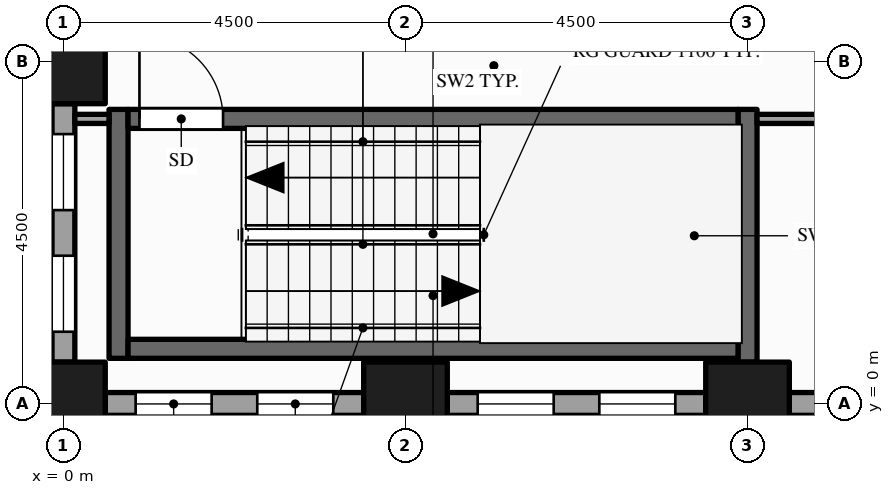
"""IFC4 building model, lengths in metres.
Left out: names, types, materials, properties, quantities, classifications, styles, units other than length and angle.
Written with IfcOpenShell. Run it as: python <this file> out.ifc"""

import sys

from ifc_helpers import new_model, si_unit, direction, frame, frame_2d, origin, origin_2d, place, context, subcontext, project, spatial, rectangle, hollow_rectangle, extrude, element, fill, save


model = new_model("IFC4")
c1 = context("Model", 3, precision=1e-05, world=origin(), true_north=direction((0.0, 1.0)))
c2 = subcontext(c1, "Body", "Model", "MODEL_VIEW")
j1 = project(units=[si_unit("LENGTHUNIT", "METRE"), si_unit("PLANEANGLEUNIT", "RADIAN")], contexts=[c1])
p1 = place(None, origin())
s1 = spatial("IfcSite", under=j1, at=p1, CompositionType="ELEMENT")
p2 = place(p1, origin())
s2 = spatial("IfcBuilding", under=s1, at=p2, CompositionType="ELEMENT")
p3 = place(p2, frame((0.0, 0.0, 69.0)))
s3 = spatial("IfcBuildingStorey", under=s2, at=p3, CompositionType="ELEMENT", Elevation=69.0)
for number, where, z_axis, x_axis in (
    (1, (0.0, 0.0, -0.15), (0.0, 0.0, 1.0), (1.0, 0.0, 0.0)),
    (2, (0.0, 4.5, -0.15), (0.0, 0.0, 1.0), (1.0, 0.0, 0.0)),
    (3, (4.5, 0.0, -0.15), (0.0, 0.0, 1.0), (1.0, 0.0, 0.0)),
    (4, (9.0, 0.0, -0.15), (0.0, 0.0, 1.0), (1.0, 0.0, 0.0)),
):
    element("IfcColumn", number, at=place(p3, frame(where, z_axis=z_axis, x_axis=x_axis)), inside=s3, PredefinedType="COLUMN", context=c2, shape_type="SweptSolid", body=[
        extrude(hollow_rectangle(XDim=1.1, YDim=1.1, WallThickness=0.06, at=origin_2d()), origin(), (0.0, 0.0, 1.0), 4.0),
    ])
p4 = place(p3, frame((0.55, 0.0, 0.0), z_axis=(0.0, 0.0, 1.0), x_axis=(1.0, 0.0, 0.0)))
e5 = element("IfcWall", 5, at=p4, inside=s3, PredefinedType="STANDARD", context=c2, shape_type="SweptSolid", body=[
    extrude(rectangle(XDim=3.4, YDim=0.3, at=frame_2d((1.7, 0.0))), origin(), (0.0, 0.0, 1.0), 3.144),
])
p5 = place(p4, frame((0.4, 0.0, 0.9)))
e6 = element("IfcOpeningElement", 6, at=p5, cuts=e5, PredefinedType="OPENING", context=c2, shape_type="SweptSolid", body=[
    extrude(rectangle(XDim=1.0, YDim=2.0, at=frame_2d((0.5, 1.0))), frame((0.0, 0.16, 0.0), z_axis=(0.0, -1.0, 0.0), x_axis=(1.0, 0.0, 0.0)), (0.0, 0.0, 1.0), 0.32),
])
p6 = place(p4, frame((2.0, 0.0, 0.9)))
e7 = element("IfcOpeningElement", 7, at=p6, cuts=e5, PredefinedType="OPENING", context=c2, shape_type="SweptSolid", body=[
    extrude(rectangle(XDim=1.0, YDim=2.0, at=frame_2d((0.5, 1.0))), frame((0.0, 0.16, 0.0), z_axis=(0.0, -1.0, 0.0), x_axis=(1.0, 0.0, 0.0)), (0.0, 0.0, 1.0), 0.32),
])
p7 = place(p3, frame((5.05, 0.0, 0.0), z_axis=(0.0, 0.0, 1.0), x_axis=(1.0, 0.0, 0.0)))
e8 = element("IfcWall", 8, at=p7, inside=s3, PredefinedType="STANDARD", context=c2, shape_type="SweptSolid", body=[
    extrude(rectangle(XDim=3.4, YDim=0.3, at=frame_2d((1.7, 0.0))), origin(), (0.0, 0.0, 1.0), 3.144),
])
p8 = place(p7, frame((0.4, 0.0, 0.9)))
e9 = element("IfcOpeningElement", 9, at=p8, cuts=e8, PredefinedType="OPENING", context=c2, shape_type="SweptSolid", body=[
    extrude(rectangle(XDim=1.0, YDim=2.0, at=frame_2d((0.5, 1.0))), frame((0.0, 0.16, 0.0), z_axis=(0.0, -1.0, 0.0), x_axis=(1.0, 0.0, 0.0)), (0.0, 0.0, 1.0), 0.32),
])
p9 = place(p7, frame((2.0, 0.0, 0.9)))
e10 = element("IfcOpeningElement", 10, at=p9, cuts=e8, PredefinedType="OPENING", context=c2, shape_type="SweptSolid", body=[
    extrude(rectangle(XDim=1.0, YDim=2.0, at=frame_2d((0.5, 1.0))), frame((0.0, 0.16, 0.0), z_axis=(0.0, -1.0, 0.0), x_axis=(1.0, 0.0, 0.0)), (0.0, 0.0, 1.0), 0.32),
])
p10 = place(p3, frame((9.55, 0.0, 0.0), z_axis=(0.0, 0.0, 1.0), x_axis=(1.0, 0.0, 0.0)))
e11 = element("IfcWall", 11, at=p10, inside=s3, PredefinedType="STANDARD", context=c2, shape_type="SweptSolid", body=[
    extrude(rectangle(XDim=3.4, YDim=0.3, at=frame_2d((1.7, 0.0))), origin(), (0.0, 0.0, 1.0), 3.144),
])
p11 = place(p10, frame((0.4, 0.0, 0.9)))
e12 = element("IfcOpeningElement", 12, at=p11, cuts=e11, PredefinedType="OPENING", context=c2, shape_type="SweptSolid", body=[
    extrude(rectangle(XDim=1.0, YDim=2.0, at=frame_2d((0.5, 1.0))), frame((0.0, 0.16, 0.0), z_axis=(0.0, -1.0, 0.0), x_axis=(1.0, 0.0, 0.0)), (0.0, 0.0, 1.0), 0.32),
])
p12 = place(p10, frame((2.0, 0.0, 0.9)))
e13 = element("IfcOpeningElement", 13, at=p12, cuts=e11, PredefinedType="OPENING", context=c2, shape_type="SweptSolid", body=[
    extrude(rectangle(XDim=1.0, YDim=2.0, at=frame_2d((0.5, 1.0))), frame((0.0, 0.16, 0.0), z_axis=(0.0, -1.0, 0.0), x_axis=(1.0, 0.0, 0.0)), (0.0, 0.0, 1.0), 0.32),
])
p13 = place(p3, frame((0.0, 3.95, 0.0), z_axis=(0.0, 0.0, 1.0), x_axis=(0.0, -1.0, 0.0)))
e14 = element("IfcWall", 14, at=p13, inside=s3, PredefinedType="STANDARD", context=c2, shape_type="SweptSolid", body=[
    extrude(rectangle(XDim=3.4, YDim=0.3, at=frame_2d((1.7, 0.0))), origin(), (0.0, 0.0, 1.0), 3.144),
])
p14 = place(p13, frame((0.4, 0.0, 0.9)))
e15 = element("IfcOpeningElement", 15, at=p14, cuts=e14, PredefinedType="OPENING", context=c2, shape_type="SweptSolid", body=[
    extrude(rectangle(XDim=1.0, YDim=2.0, at=frame_2d((0.5, 1.0))), frame((0.0, 0.16, 0.0), z_axis=(0.0, -1.0, 0.0), x_axis=(1.0, 0.0, 0.0)), (0.0, 0.0, 1.0), 0.32),
])
p15 = place(p13, frame((2.0, 0.0, 0.9)))
e16 = element("IfcOpeningElement", 16, at=p15, cuts=e14, PredefinedType="OPENING", context=c2, shape_type="SweptSolid", body=[
    extrude(rectangle(XDim=1.0, YDim=2.0, at=frame_2d((0.5, 1.0))), frame((0.0, 0.16, 0.0), z_axis=(0.0, -1.0, 0.0), x_axis=(1.0, 0.0, 0.0)), (0.0, 0.0, 1.0), 0.32),
])
p16 = place(p3, frame((0.725, 0.6, 0.0), z_axis=(0.0, 0.0, 1.0), x_axis=(0.0, 1.0, 0.0)))
e17 = element("IfcWall", 17, at=p16, inside=s3, PredefinedType="SHEAR", context=c2, shape_type="SweptSolid", body=[
    extrude(rectangle(XDim=3.275, YDim=0.25, at=frame_2d((1.637, 0.0))), origin(), (0.0, 0.0, 1.0), 3.85),
])
p17 = place(p3, frame((9.0, 0.55, 0.0), z_axis=(0.0, 0.0, 1.0), x_axis=(0.0, 1.0, 0.0)))
e18 = element("IfcWall", 18, at=p17, inside=s3, PredefinedType="SHEAR", context=c2, shape_type="SweptSolid", body=[
    extrude(rectangle(XDim=3.325, YDim=0.25, at=frame_2d((1.663, 0.0))), origin(), (0.0, 0.0, 1.0), 3.85),
])
p18 = place(p3, frame((0.85, 0.725, 0.0), z_axis=(0.0, 0.0, 1.0), x_axis=(1.0, 0.0, 0.0)))
e19 = element("IfcWall", 19, at=p18, inside=s3, PredefinedType="SHEAR", context=c2, shape_type="SweptSolid", body=[
    extrude(rectangle(XDim=8.025, YDim=0.25, at=frame_2d((4.012, 0.0))), origin(), (0.0, 0.0, 1.0), 3.85),
])
p19 = place(p3, frame((0.15, 3.75, 0.0), z_axis=(0.0, 0.0, 1.0), x_axis=(1.0, 0.0, 0.0)))
e20 = element("IfcWall", 20, at=p19, inside=s3, PredefinedType="PARTITIONING", context=c2, shape_type="SweptSolid", body=[
    extrude(rectangle(XDim=0.45, YDim=0.12, at=frame_2d((0.225, 0.0))), origin(), (0.0, 0.0, 1.0), 3.144),
])
p20 = place(p3, frame((0.85, 3.75, 0.0), z_axis=(0.0, 0.0, 1.0), x_axis=(1.0, 0.0, 0.0)))
e21 = element("IfcWall", 21, at=p20, inside=s3, PredefinedType="SHEAR", context=c2, shape_type="SweptSolid", body=[
    extrude(rectangle(XDim=8.025, YDim=0.25, at=frame_2d((4.012, 0.0))), origin(), (0.0, 0.0, 1.0), 3.85),
])
p21 = place(p20, frame((0.15, 0.0, 0.0)))
e22 = element("IfcOpeningElement", 22, at=p21, cuts=e21, PredefinedType="OPENING", context=c2, shape_type="SweptSolid", body=[
    extrude(rectangle(XDim=1.1, YDim=2.1, at=frame_2d((0.55, 1.05))), frame((0.0, 0.135, 0.0), z_axis=(0.0, -1.0, 0.0), x_axis=(1.0, 0.0, 0.0)), (0.0, 0.0, 1.0), 0.27),
])
p22 = place(p3, frame((9.125, 3.75, 0.0), z_axis=(0.0, 0.0, 1.0), x_axis=(1.0, 0.0, 0.0)))
e23 = element("IfcWall", 23, at=p22, inside=s3, PredefinedType="PARTITIONING", context=c2, shape_type="SweptSolid", body=[
    extrude(rectangle(XDim=2.065, YDim=0.12, at=frame_2d((1.032, 0.0))), origin(), (0.0, 0.0, 1.0), 2.938),
])
p23 = place(p5, origin())
e24 = element("IfcWindow", 24, at=p23, inside=s3, PartitioningType="SINGLE_PANEL", PredefinedType="WINDOW", context=c2, shape_type="SweptSolid", body=[
    extrude(rectangle(XDim=1.0, YDim=2.0, at=frame_2d((0.5, 1.0))), frame((0.0, 0.03, 0.0), z_axis=(0.0, -1.0, 0.0), x_axis=(1.0, 0.0, 0.0)), (0.0, 0.0, 1.0), 0.06),
])
fill(e6, e24)
p24 = place(p6, origin())
e25 = element("IfcWindow", 25, at=p24, inside=s3, PartitioningType="SINGLE_PANEL", PredefinedType="WINDOW", context=c2, shape_type="SweptSolid", body=[
    extrude(rectangle(XDim=1.0, YDim=2.0, at=frame_2d((0.5, 1.0))), frame((0.0, 0.03, 0.0), z_axis=(0.0, -1.0, 0.0), x_axis=(1.0, 0.0, 0.0)), (0.0, 0.0, 1.0), 0.06),
])
fill(e7, e25)
p25 = place(p8, origin())
e26 = element("IfcWindow", 26, at=p25, inside=s3, PartitioningType="SINGLE_PANEL", PredefinedType="WINDOW", context=c2, shape_type="SweptSolid", body=[
    extrude(rectangle(XDim=1.0, YDim=2.0, at=frame_2d((0.5, 1.0))), frame((0.0, 0.03, 0.0), z_axis=(0.0, -1.0, 0.0), x_axis=(1.0, 0.0, 0.0)), (0.0, 0.0, 1.0), 0.06),
])
fill(e9, e26)
p26 = place(p9, origin())
e27 = element("IfcWindow", 27, at=p26, inside=s3, PartitioningType="SINGLE_PANEL", PredefinedType="WINDOW", context=c2, shape_type="SweptSolid", body=[
    extrude(rectangle(XDim=1.0, YDim=2.0, at=frame_2d((0.5, 1.0))), frame((0.0, 0.03, 0.0), z_axis=(0.0, -1.0, 0.0), x_axis=(1.0, 0.0, 0.0)), (0.0, 0.0, 1.0), 0.06),
])
fill(e10, e27)
p27 = place(p14, origin())
e28 = element("IfcWindow", 28, at=p27, inside=s3, PartitioningType="SINGLE_PANEL", PredefinedType="WINDOW", context=c2, shape_type="SweptSolid", body=[
    extrude(rectangle(XDim=1.0, YDim=2.0, at=frame_2d((0.5, 1.0))), frame((0.0, 0.03, 0.0), z_axis=(0.0, -1.0, 0.0), x_axis=(1.0, 0.0, 0.0)), (0.0, 0.0, 1.0), 0.06),
])
fill(e15, e28)
p28 = place(p15, origin())
e29 = element("IfcWindow", 29, at=p28, inside=s3, PartitioningType="SINGLE_PANEL", PredefinedType="WINDOW", context=c2, shape_type="SweptSolid", body=[
    extrude(rectangle(XDim=1.0, YDim=2.0, at=frame_2d((0.5, 1.0))), frame((0.0, 0.03, 0.0), z_axis=(0.0, -1.0, 0.0), x_axis=(1.0, 0.0, 0.0)), (0.0, 0.0, 1.0), 0.06),
])
fill(e16, e29)
p29 = place(p21, origin())
e30 = element("IfcDoor", 30, at=p29, inside=s3, OperationType="SINGLE_SWING_LEFT", PredefinedType="DOOR", context=c2, shape_type="SweptSolid", body=[
    extrude(rectangle(XDim=1.1, YDim=2.1, at=frame_2d((0.55, 1.05))), frame((0.0, 0.025, 0.0), z_axis=(0.0, -1.0, 0.0), x_axis=(1.0, 0.0, 0.0)), (0.0, 0.0, 1.0), 0.05),
])
fill(e22, e30)
save(model, sys.argv[1])
